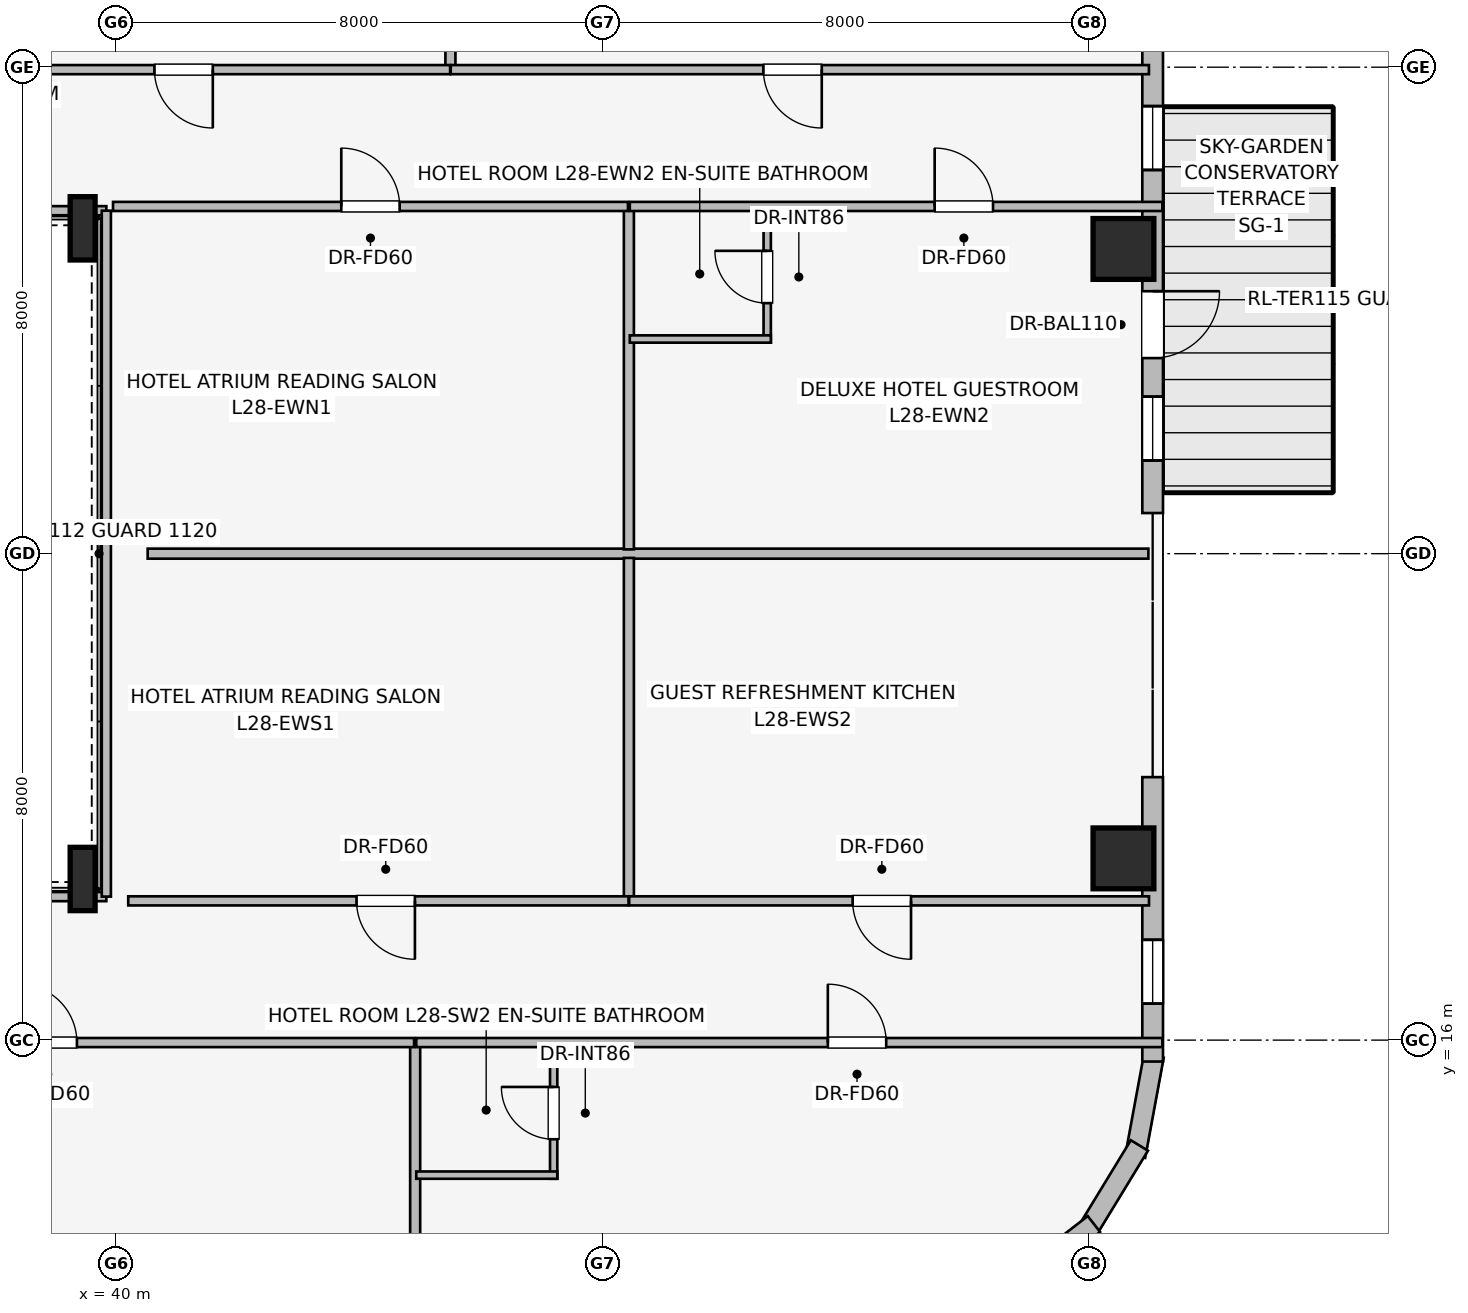
"""IFC4 building model, lengths in metres.
Left out: names, types, materials, properties, quantities, classifications, styles, units other than length and angle.
Written with IfcOpenShell. Run it as: python <this file> out.ifc"""

import sys

from ifc_helpers import new_model, si_unit, direction, frame, frame_2d, origin, origin_2d, place, context, subcontext, project, spatial, rectangle, i_section, extrude, element, fill, save


model = new_model("IFC4")
c1 = context("Model", 3, precision=1e-05, world=origin(), true_north=direction((0.0, 1.0)))
c2 = subcontext(c1, "Body", "Model", "MODEL_VIEW")
j1 = project(units=[si_unit("LENGTHUNIT", "METRE"), si_unit("PLANEANGLEUNIT", "RADIAN")], contexts=[c1])
p1 = place(None, origin())
s1 = spatial("IfcSite", under=j1, at=p1, CompositionType="ELEMENT")
p2 = place(p1, origin())
s2 = spatial("IfcBuilding", under=s1, at=p2, CompositionType="ELEMENT")
p3 = place(p2, frame((0.0, 0.0, 108.45)))
s3 = spatial("IfcBuildingStorey", under=s2, at=p3, CompositionType="ELEMENT", Elevation=108.45)
for number, where, z_axis, x_axis in (
    (1, (56.568, 18.989, 0.0), (0.0, 0.0, 1.0), (1.0, 0.0, 0.0)),
    (2, (56.568, 29.011, 0.0), (0.0, 0.0, 1.0), (1.0, 0.0, 0.0)),
):
    element("IfcColumn", number, at=place(p3, frame(where, z_axis=z_axis, x_axis=x_axis)), inside=s3, PredefinedType="COLUMN", context=c2, shape_type="SweptSolid", body=[
        extrude(rectangle(XDim=1.0, YDim=1.0, at=origin_2d()), origin(), (0.0, 0.0, 1.0), 3.45),
    ])
for number, where, z_axis, x_axis in (
    (3, (39.45, 18.65, 0.0), (0.0, 0.0, 1.0), (1.0, 0.0, 0.0)),
    (4, (39.45, 29.35, 0.0), (0.0, 0.0, 1.0), (1.0, 0.0, 0.0)),
):
    element("IfcColumn", number, at=place(p3, frame(where, z_axis=z_axis, x_axis=x_axis)), inside=s3, PredefinedType="COLUMN", context=c2, shape_type="SweptSolid", body=[
        extrude(i_section(OverallWidth=0.41, OverallDepth=1.041, WebThickness=0.031, FlangeThickness=0.056, at=origin_2d()), origin(), (0.0, 0.0, 1.0), 3.45),
    ])
for number, where, z_axis, x_axis in (
    (5, (56.763, 33.907, 0.0), (0.0, 0.0, 1.0), (0.182, -0.983, 0.0)),
    (6, (57.068, 15.742, 0.0), (0.0, 0.0, 1.0), (-0.182, -0.983, 0.0)),
):
    element("IfcWall", number, at=place(p3, frame(where, z_axis=z_axis, x_axis=x_axis)), inside=s3, PredefinedType="STANDARD", context=c2, shape_type="SweptSolid", body=[
        extrude(rectangle(XDim=1.677, YDim=0.33, at=frame_2d((0.838, 0.0))), origin(), (0.0, 0.0, 1.0), 3.16),
    ])
p4 = place(p3, frame((56.83, 14.268, 0.0), z_axis=(0.0, 0.0, 1.0), x_axis=(-0.520519429557, -0.853849824883, 0.0)))
e7 = element("IfcWall", 7, at=p4, inside=s3, PredefinedType="STANDARD", context=c2, shape_type="SweptSolid", body=[
    extrude(rectangle(XDim=1.677, YDim=0.33, at=frame_2d((0.839, 0.0))), origin(), (0.0, 0.0, 1.0), 3.16),
])
p5 = place(p3, frame((56.082, 12.976, 0.0), z_axis=(0.0, 0.0, 1.0), x_axis=(-0.790621329885, -0.612305408053, 0.0)))
e8 = element("IfcWall", 8, at=p5, inside=s3, PredefinedType="STANDARD", context=c2, shape_type="SweptSolid", body=[
    extrude(rectangle(XDim=1.676, YDim=0.33, at=frame_2d((0.838, 0.0))), origin(), (0.0, 0.0, 1.0), 3.16),
])
p6 = place(p3, frame((57.048, 32.352, 0.0), z_axis=(0.0, 0.0, 1.0), x_axis=(0.0, -1.0, 0.0)))
e9 = element("IfcWall", 9, at=p6, inside=s3, PredefinedType="STANDARD", context=c2, shape_type="SweptSolid", body=[
    extrude(rectangle(XDim=7.684, YDim=0.34, at=frame_2d((3.842, 0.0))), origin(), (0.0, 0.0, 1.0), 3.16),
])
p7 = place(p6, frame((4.036, 0.0, 0.0)))
e10 = element("IfcOpeningElement", 10, at=p7, cuts=e9, PredefinedType="OPENING", context=c2, shape_type="SweptSolid", body=[
    extrude(rectangle(XDim=1.1, YDim=2.04, at=frame_2d((0.55, 1.02))), frame((0.0, 0.18, 0.0), z_axis=(0.0, -1.0, 0.0), x_axis=(1.0, 0.0, 0.0)), (0.0, 0.0, 1.0), 0.36),
])
p8 = place(p6, frame((0.992, 0.0, 0.75)))
e11 = element("IfcOpeningElement", 11, at=p8, cuts=e9, PredefinedType="OPENING", context=c2, shape_type="SweptSolid", body=[
    extrude(rectangle(XDim=1.05, YDim=1.4, at=frame_2d((0.525, 0.7))), frame((0.0, 0.18, 0.0), z_axis=(0.0, -1.0, 0.0), x_axis=(1.0, 0.0, 0.0)), (0.0, 0.0, 1.0), 0.36),
])
p9 = place(p6, frame((5.77, 0.0, 0.75)))
e12 = element("IfcOpeningElement", 12, at=p9, cuts=e9, PredefinedType="OPENING", context=c2, shape_type="SweptSolid", body=[
    extrude(rectangle(XDim=1.05, YDim=1.4, at=frame_2d((0.525, 0.7))), frame((0.0, 0.18, 0.0), z_axis=(0.0, -1.0, 0.0), x_axis=(1.0, 0.0, 0.0)), (0.0, 0.0, 1.0), 0.36),
])
p10 = place(p3, frame((57.048, 20.325, 0.0), z_axis=(0.0, 0.0, 1.0), x_axis=(0.0, -1.0, 0.0)))
e13 = element("IfcWall", 13, at=p10, inside=s3, PredefinedType="STANDARD", context=c2, shape_type="SweptSolid", body=[
    extrude(rectangle(XDim=4.677, YDim=0.34, at=frame_2d((2.338, 0.0))), origin(), (0.0, 0.0, 1.0), 3.16),
])
p11 = place(p10, frame((2.675, 0.0, 0.75)))
e14 = element("IfcOpeningElement", 14, at=p11, cuts=e13, PredefinedType="OPENING", context=c2, shape_type="SweptSolid", body=[
    extrude(rectangle(XDim=1.05, YDim=1.4, at=frame_2d((0.525, 0.7))), frame((0.0, 0.18, 0.0), z_axis=(0.0, -1.0, 0.0), x_axis=(1.0, 0.0, 0.0)), (0.0, 0.0, 1.0), 0.36),
])
p12 = place(p3, frame((27.675, 18.36, 0.0), z_axis=(0.0, 0.0, 1.0), x_axis=(1.0, 0.0, 0.0)))
e15 = element("IfcWall", 15, at=p12, inside=s3, PredefinedType="PARTITIONING", context=c2, shape_type="SweptSolid", body=[
    extrude(rectangle(XDim=12.165, YDim=0.15, at=frame_2d((6.083, 0.0))), origin(), (0.0, 0.0, 1.0), 2.301),
])
p13 = place(p3, frame((39.84, 29.64, 0.0), z_axis=(0.0, 0.0, 1.0), x_axis=(-1.0, 0.0, 0.0)))
e16 = element("IfcWall", 16, at=p13, inside=s3, PredefinedType="PARTITIONING", context=c2, shape_type="SweptSolid", body=[
    extrude(rectangle(XDim=12.2, YDim=0.15, at=frame_2d((6.1, 0.0))), origin(), (0.0, 0.0, 1.0), 2.301),
])
p14 = place(p3, frame((39.84, 18.36, 0.0), z_axis=(0.0, 0.0, 1.0), x_axis=(0.0, 1.0, 0.0)))
e17 = element("IfcWall", 17, at=p14, inside=s3, PredefinedType="PARTITIONING", context=c2, shape_type="SweptSolid", body=[
    extrude(rectangle(XDim=11.28, YDim=0.15, at=frame_2d((5.64, 0.0))), origin(), (0.0, 0.0, 1.0), 3.16),
])
p15 = place(p3, frame((45.499, 31.97, 0.0), z_axis=(0.0, 0.0, 1.0), x_axis=(0.0, 1.0, 0.0)))
e18 = element("IfcWall", 18, at=p15, inside=s3, PredefinedType="PARTITIONING", context=c2, shape_type="SweptSolid", body=[
    extrude(rectangle(XDim=8.702, YDim=0.165, at=frame_2d((4.351, 0.0))), origin(), (0.0, 0.0, 1.0), 3.16),
])
p16 = place(p3, frame((45.494, 31.96, 0.0), z_axis=(0.0, 0.0, 1.0), x_axis=(-1.0, 0.0, 0.0)))
e19 = element("IfcWall", 19, at=p16, inside=s3, PredefinedType="PARTITIONING", context=c2, shape_type="SweptSolid", body=[
    extrude(rectangle(XDim=11.204, YDim=0.15, at=frame_2d((5.602, 0.0))), origin(), (0.0, 0.0, 1.0), 3.16),
])
p17 = place(p16, frame((3.903, 0.0, 0.0)))
e20 = element("IfcOpeningElement", 20, at=p17, cuts=e19, PredefinedType="OPENING", context=c2, shape_type="SweptSolid", body=[
    extrude(rectangle(XDim=0.96, YDim=2.0, at=frame_2d((0.48, 1.0))), frame((0.0, 0.085, 0.0), z_axis=(0.0, -1.0, 0.0), x_axis=(1.0, 0.0, 0.0)), (0.0, 0.0, 1.0), 0.17),
])
p18 = place(p3, frame((56.987, 31.96, 0.0), z_axis=(0.0, 0.0, 1.0), x_axis=(-1.0, 0.0, 0.0)))
e21 = element("IfcWall", 21, at=p18, inside=s3, PredefinedType="PARTITIONING", context=c2, shape_type="SweptSolid", body=[
    extrude(rectangle(XDim=11.483, YDim=0.15, at=frame_2d((5.742, 0.0))), origin(), (0.0, 0.0, 1.0), 3.16),
])
p19 = place(p18, frame((5.381, 0.0, 0.0)))
e22 = element("IfcOpeningElement", 22, at=p19, cuts=e21, PredefinedType="OPENING", context=c2, shape_type="SweptSolid", body=[
    extrude(rectangle(XDim=0.96, YDim=2.0, at=frame_2d((0.48, 1.0))), frame((0.0, 0.085, 0.0), z_axis=(0.0, -1.0, 0.0), x_axis=(1.0, 0.0, 0.0)), (0.0, 0.0, 1.0), 0.17),
])
p20 = place(p3, frame((40.52, 24.0, 0.0), z_axis=(0.0, 0.0, 1.0), x_axis=(1.0, 0.0, 0.0)))
e23 = element("IfcWall", 23, at=p20, inside=s3, PredefinedType="PARTITIONING", context=c2, shape_type="SweptSolid", body=[
    extrude(rectangle(XDim=16.458, YDim=0.165, at=frame_2d((8.229, 0.0))), origin(), (0.0, 0.0, 1.0), 3.16),
])
p21 = place(p3, frame((48.434, 24.07, 0.0), z_axis=(0.0, 0.0, 1.0), x_axis=(0.0, 1.0, 0.0)))
e24 = element("IfcWall", 24, at=p21, inside=s3, PredefinedType="PARTITIONING", context=c2, shape_type="SweptSolid", body=[
    extrude(rectangle(XDim=5.64, YDim=0.165, at=frame_2d((2.82, 0.0))), origin(), (0.0, 0.0, 1.0), 3.16),
])
p22 = place(p3, frame((39.95, 29.71, 0.0), z_axis=(0.0, 0.0, 1.0), x_axis=(1.0, 0.0, 0.0)))
e25 = element("IfcWall", 25, at=p22, inside=s3, PredefinedType="PARTITIONING", context=c2, shape_type="SweptSolid", body=[
    extrude(rectangle(XDim=8.469, YDim=0.15, at=frame_2d((4.234, 0.0))), origin(), (0.0, 0.0, 1.0), 3.16),
])
p23 = place(p22, frame((3.754, 0.0, 0.0)))
e26 = element("IfcOpeningElement", 26, at=p23, cuts=e25, PredefinedType="OPENING", context=c2, shape_type="SweptSolid", body=[
    extrude(rectangle(XDim=0.96, YDim=2.0, at=frame_2d((0.48, 1.0))), frame((0.0, 0.085, 0.0), z_axis=(0.0, -1.0, 0.0), x_axis=(1.0, 0.0, 0.0)), (0.0, 0.0, 1.0), 0.17),
])
p24 = place(p3, frame((50.709, 27.47, 0.0), z_axis=(0.0, 0.0, 1.0), x_axis=(0.0, 1.0, 0.0)))
e27 = element("IfcWall", 27, at=p24, inside=s3, PredefinedType="PARTITIONING", context=c2, shape_type="SweptSolid", body=[
    extrude(rectangle(XDim=2.24, YDim=0.12, at=frame_2d((1.12, 0.0))), origin(), (0.0, 0.0, 1.0), 3.16),
])
p25 = place(p24, frame((0.65, 0.0, 0.0)))
e28 = element("IfcOpeningElement", 28, at=p25, cuts=e27, PredefinedType="OPENING", context=c2, shape_type="SweptSolid", body=[
    extrude(rectangle(XDim=0.86, YDim=2.0, at=frame_2d((0.43, 1.0))), frame((0.0, 0.07, 0.0), z_axis=(0.0, -1.0, 0.0), x_axis=(1.0, 0.0, 0.0)), (0.0, 0.0, 1.0), 0.14),
])
p26 = place(p3, frame((48.449, 27.53, 0.0), z_axis=(0.0, 0.0, 1.0), x_axis=(1.0, 0.0, 0.0)))
e29 = element("IfcWall", 29, at=p26, inside=s3, PredefinedType="PARTITIONING", context=c2, shape_type="SweptSolid", body=[
    extrude(rectangle(XDim=2.32, YDim=0.12, at=frame_2d((1.16, 0.0))), origin(), (0.0, 0.0, 1.0), 3.16),
])
p27 = place(p3, frame((48.449, 29.71, 0.0), z_axis=(0.0, 0.0, 1.0), x_axis=(1.0, 0.0, 0.0)))
e30 = element("IfcWall", 30, at=p27, inside=s3, PredefinedType="PARTITIONING", context=c2, shape_type="SweptSolid", body=[
    extrude(rectangle(XDim=8.759, YDim=0.15, at=frame_2d((4.379, 0.0))), origin(), (0.0, 0.0, 1.0), 3.16),
])
p28 = place(p27, frame((5.014, 0.0, 0.0)))
e31 = element("IfcOpeningElement", 31, at=p28, cuts=e30, PredefinedType="OPENING", context=c2, shape_type="SweptSolid", body=[
    extrude(rectangle(XDim=0.96, YDim=2.0, at=frame_2d((0.48, 1.0))), frame((0.0, 0.085, 0.0), z_axis=(0.0, -1.0, 0.0), x_axis=(1.0, 0.0, 0.0)), (0.0, 0.0, 1.0), 0.17),
])
p29 = place(p3, frame((48.434, 18.29, 0.0), z_axis=(0.0, 0.0, 1.0), x_axis=(0.0, 1.0, 0.0)))
e32 = element("IfcWall", 32, at=p29, inside=s3, PredefinedType="PARTITIONING", context=c2, shape_type="SweptSolid", body=[
    extrude(rectangle(XDim=5.64, YDim=0.165, at=frame_2d((2.82, 0.0))), origin(), (0.0, 0.0, 1.0), 3.16),
])
p30 = place(p3, frame((48.429, 18.29, 0.0), z_axis=(0.0, 0.0, 1.0), x_axis=(-1.0, 0.0, 0.0)))
e33 = element("IfcWall", 33, at=p30, inside=s3, PredefinedType="PARTITIONING", context=c2, shape_type="SweptSolid", body=[
    extrude(rectangle(XDim=8.229, YDim=0.15, at=frame_2d((4.115, 0.0))), origin(), (0.0, 0.0, 1.0), 3.16),
])
p31 = place(p30, frame((3.514, 0.0, 0.0)))
e34 = element("IfcOpeningElement", 34, at=p31, cuts=e33, PredefinedType="OPENING", context=c2, shape_type="SweptSolid", body=[
    extrude(rectangle(XDim=0.96, YDim=2.0, at=frame_2d((0.48, 1.0))), frame((0.0, 0.085, 0.0), z_axis=(0.0, -1.0, 0.0), x_axis=(1.0, 0.0, 0.0)), (0.0, 0.0, 1.0), 0.17),
])
p32 = place(p3, frame((56.988, 18.29, 0.0), z_axis=(0.0, 0.0, 1.0), x_axis=(-1.0, 0.0, 0.0)))
e35 = element("IfcWall", 35, at=p32, inside=s3, PredefinedType="PARTITIONING", context=c2, shape_type="SweptSolid", body=[
    extrude(rectangle(XDim=8.549, YDim=0.15, at=frame_2d((4.274, 0.0))), origin(), (0.0, 0.0, 1.0), 3.16),
])
p33 = place(p32, frame((3.914, 0.0, 0.0)))
e36 = element("IfcOpeningElement", 36, at=p33, cuts=e35, PredefinedType="OPENING", context=c2, shape_type="SweptSolid", body=[
    extrude(rectangle(XDim=0.96, YDim=2.0, at=frame_2d((0.48, 1.0))), frame((0.0, 0.085, 0.0), z_axis=(0.0, -1.0, 0.0), x_axis=(1.0, 0.0, 0.0)), (0.0, 0.0, 1.0), 0.17),
])
p34 = place(p3, frame((44.919, 7.029, 0.0), z_axis=(0.0, 0.0, 1.0), x_axis=(0.0, 1.0, 0.0)))
e37 = element("IfcWall", 37, at=p34, inside=s3, PredefinedType="PARTITIONING", context=c2, shape_type="SweptSolid", body=[
    extrude(rectangle(XDim=8.901, YDim=0.165, at=frame_2d((4.45, 0.0))), origin(), (0.0, 0.0, 1.0), 3.16),
])
p35 = place(p3, frame((32.85, 15.96, 0.0), z_axis=(0.0, 0.0, 1.0), x_axis=(1.0, 0.0, 0.0)))
e38 = element("IfcWall", 38, at=p35, inside=s3, PredefinedType="PARTITIONING", context=c2, shape_type="SweptSolid", body=[
    extrude(rectangle(XDim=12.051, YDim=0.15, at=frame_2d((6.025, 0.0))), origin(), (0.0, 0.0, 1.0), 3.16),
])
p36 = place(p35, frame((5.546, 0.0, 0.0)))
e39 = element("IfcOpeningElement", 39, at=p36, cuts=e38, PredefinedType="OPENING", context=c2, shape_type="SweptSolid", body=[
    extrude(rectangle(XDim=0.96, YDim=2.0, at=frame_2d((0.48, 1.0))), frame((0.0, 0.085, 0.0), z_axis=(0.0, -1.0, 0.0), x_axis=(1.0, 0.0, 0.0)), (0.0, 0.0, 1.0), 0.17),
])
p37 = place(p3, frame((47.197, 13.72, 0.0), z_axis=(0.0, 0.0, 1.0), x_axis=(0.0, 1.0, 0.0)))
e40 = element("IfcWall", 40, at=p37, inside=s3, PredefinedType="PARTITIONING", context=c2, shape_type="SweptSolid", body=[
    extrude(rectangle(XDim=2.24, YDim=0.12, at=frame_2d((1.12, 0.0))), origin(), (0.0, 0.0, 1.0), 3.16),
])
p38 = place(p37, frame((0.65, 0.0, 0.0)))
e41 = element("IfcOpeningElement", 41, at=p38, cuts=e40, PredefinedType="OPENING", context=c2, shape_type="SweptSolid", body=[
    extrude(rectangle(XDim=0.86, YDim=2.0, at=frame_2d((0.43, 1.0))), frame((0.0, 0.07, 0.0), z_axis=(0.0, -1.0, 0.0), x_axis=(1.0, 0.0, 0.0)), (0.0, 0.0, 1.0), 0.14),
])
p39 = place(p3, frame((44.937, 13.78, 0.0), z_axis=(0.0, 0.0, 1.0), x_axis=(1.0, 0.0, 0.0)))
e42 = element("IfcWall", 42, at=p39, inside=s3, PredefinedType="PARTITIONING", context=c2, shape_type="SweptSolid", body=[
    extrude(rectangle(XDim=2.32, YDim=0.12, at=frame_2d((1.16, 0.0))), origin(), (0.0, 0.0, 1.0), 3.16),
])
p40 = place(p3, frame((44.937, 15.96, 0.0), z_axis=(0.0, 0.0, 1.0), x_axis=(1.0, 0.0, 0.0)))
e43 = element("IfcWall", 43, at=p40, inside=s3, PredefinedType="PARTITIONING", context=c2, shape_type="SweptSolid", body=[
    extrude(rectangle(XDim=12.271, YDim=0.15, at=frame_2d((6.135, 0.0))), origin(), (0.0, 0.0, 1.0), 3.16),
])
p41 = place(p40, frame((6.769, 0.0, 0.0)))
e44 = element("IfcOpeningElement", 44, at=p41, cuts=e43, PredefinedType="OPENING", context=c2, shape_type="SweptSolid", body=[
    extrude(rectangle(XDim=0.96, YDim=2.0, at=frame_2d((0.48, 1.0))), frame((0.0, 0.085, 0.0), z_axis=(0.0, -1.0, 0.0), x_axis=(1.0, 0.0, 0.0)), (0.0, 0.0, 1.0), 0.17),
])
p42 = place(p7, origin())
e45 = element("IfcDoor", 45, at=p42, inside=s3, OperationType="SINGLE_SWING_LEFT", PredefinedType="DOOR", context=c2, shape_type="SweptSolid", body=[
    extrude(rectangle(XDim=1.1, YDim=2.04, at=frame_2d((0.55, 1.02))), frame((0.0, 0.025, 0.0), z_axis=(0.0, -1.0, 0.0), x_axis=(1.0, 0.0, 0.0)), (0.0, 0.0, 1.0), 0.05),
])
fill(e10, e45)
p43 = place(p8, origin())
e46 = element("IfcWindow", 46, at=p43, inside=s3, PartitioningType="SINGLE_PANEL", PredefinedType="WINDOW", context=c2, shape_type="SweptSolid", body=[
    extrude(rectangle(XDim=1.05, YDim=1.4, at=frame_2d((0.525, 0.7))), frame((0.0, 0.03, 0.0), z_axis=(0.0, -1.0, 0.0), x_axis=(1.0, 0.0, 0.0)), (0.0, 0.0, 1.0), 0.06),
])
fill(e11, e46)
p44 = place(p9, origin())
e47 = element("IfcWindow", 47, at=p44, inside=s3, PartitioningType="SINGLE_PANEL", PredefinedType="WINDOW", context=c2, shape_type="SweptSolid", body=[
    extrude(rectangle(XDim=1.05, YDim=1.4, at=frame_2d((0.525, 0.7))), frame((0.0, 0.03, 0.0), z_axis=(0.0, -1.0, 0.0), x_axis=(1.0, 0.0, 0.0)), (0.0, 0.0, 1.0), 0.06),
])
fill(e12, e47)
p45 = place(p11, origin())
e48 = element("IfcWindow", 48, at=p45, inside=s3, PartitioningType="SINGLE_PANEL", PredefinedType="WINDOW", context=c2, shape_type="SweptSolid", body=[
    extrude(rectangle(XDim=1.05, YDim=1.4, at=frame_2d((0.525, 0.7))), frame((0.0, 0.03, 0.0), z_axis=(0.0, -1.0, 0.0), x_axis=(1.0, 0.0, 0.0)), (0.0, 0.0, 1.0), 0.06),
])
fill(e14, e48)
p46 = place(p17, origin())
e49 = element("IfcDoor", 49, at=p46, inside=s3, OperationType="SINGLE_SWING_LEFT", PredefinedType="DOOR", context=c2, shape_type="SweptSolid", body=[
    extrude(rectangle(XDim=0.96, YDim=2.0, at=frame_2d((0.48, 1.0))), frame((0.0, 0.025, 0.0), z_axis=(0.0, -1.0, 0.0), x_axis=(1.0, 0.0, 0.0)), (0.0, 0.0, 1.0), 0.05),
])
fill(e20, e49)
p47 = place(p19, origin())
e50 = element("IfcDoor", 50, at=p47, inside=s3, OperationType="SINGLE_SWING_LEFT", PredefinedType="DOOR", context=c2, shape_type="SweptSolid", body=[
    extrude(rectangle(XDim=0.96, YDim=2.0, at=frame_2d((0.48, 1.0))), frame((0.0, 0.025, 0.0), z_axis=(0.0, -1.0, 0.0), x_axis=(1.0, 0.0, 0.0)), (0.0, 0.0, 1.0), 0.05),
])
fill(e22, e50)
p48 = place(p23, origin())
e51 = element("IfcDoor", 51, at=p48, inside=s3, OperationType="SINGLE_SWING_LEFT", PredefinedType="DOOR", context=c2, shape_type="SweptSolid", body=[
    extrude(rectangle(XDim=0.96, YDim=2.0, at=frame_2d((0.48, 1.0))), frame((0.0, 0.025, 0.0), z_axis=(0.0, -1.0, 0.0), x_axis=(1.0, 0.0, 0.0)), (0.0, 0.0, 1.0), 0.05),
])
fill(e26, e51)
p49 = place(p25, origin())
e52 = element("IfcDoor", 52, at=p49, inside=s3, OperationType="SINGLE_SWING_RIGHT", PredefinedType="DOOR", context=c2, shape_type="SweptSolid", body=[
    extrude(rectangle(XDim=0.86, YDim=2.0, at=frame_2d((0.43, 1.0))), frame((0.0, 0.025, 0.0), z_axis=(0.0, -1.0, 0.0), x_axis=(1.0, 0.0, 0.0)), (0.0, 0.0, 1.0), 0.05),
])
fill(e28, e52)
p50 = place(p28, origin())
e53 = element("IfcDoor", 53, at=p50, inside=s3, OperationType="SINGLE_SWING_LEFT", PredefinedType="DOOR", context=c2, shape_type="SweptSolid", body=[
    extrude(rectangle(XDim=0.96, YDim=2.0, at=frame_2d((0.48, 1.0))), frame((0.0, 0.025, 0.0), z_axis=(0.0, -1.0, 0.0), x_axis=(1.0, 0.0, 0.0)), (0.0, 0.0, 1.0), 0.05),
])
fill(e31, e53)
p51 = place(p31, origin())
e54 = element("IfcDoor", 54, at=p51, inside=s3, OperationType="SINGLE_SWING_LEFT", PredefinedType="DOOR", context=c2, shape_type="SweptSolid", body=[
    extrude(rectangle(XDim=0.96, YDim=2.0, at=frame_2d((0.48, 1.0))), frame((0.0, 0.025, 0.0), z_axis=(0.0, -1.0, 0.0), x_axis=(1.0, 0.0, 0.0)), (0.0, 0.0, 1.0), 0.05),
])
fill(e34, e54)
p52 = place(p33, origin())
e55 = element("IfcDoor", 55, at=p52, inside=s3, OperationType="SINGLE_SWING_LEFT", PredefinedType="DOOR", context=c2, shape_type="SweptSolid", body=[
    extrude(rectangle(XDim=0.96, YDim=2.0, at=frame_2d((0.48, 1.0))), frame((0.0, 0.025, 0.0), z_axis=(0.0, -1.0, 0.0), x_axis=(1.0, 0.0, 0.0)), (0.0, 0.0, 1.0), 0.05),
])
fill(e36, e55)
p53 = place(p36, origin())
e56 = element("IfcDoor", 56, at=p53, inside=s3, OperationType="SINGLE_SWING_LEFT", PredefinedType="DOOR", context=c2, shape_type="SweptSolid", body=[
    extrude(rectangle(XDim=0.96, YDim=2.0, at=frame_2d((0.48, 1.0))), frame((0.0, 0.025, 0.0), z_axis=(0.0, -1.0, 0.0), x_axis=(1.0, 0.0, 0.0)), (0.0, 0.0, 1.0), 0.05),
])
fill(e39, e56)
p54 = place(p38, origin())
e57 = element("IfcDoor", 57, at=p54, inside=s3, OperationType="SINGLE_SWING_RIGHT", PredefinedType="DOOR", context=c2, shape_type="SweptSolid", body=[
    extrude(rectangle(XDim=0.86, YDim=2.0, at=frame_2d((0.43, 1.0))), frame((0.0, 0.025, 0.0), z_axis=(0.0, -1.0, 0.0), x_axis=(1.0, 0.0, 0.0)), (0.0, 0.0, 1.0), 0.05),
])
fill(e41, e57)
p55 = place(p41, origin())
e58 = element("IfcDoor", 58, at=p55, inside=s3, OperationType="SINGLE_SWING_LEFT", PredefinedType="DOOR", context=c2, shape_type="SweptSolid", body=[
    extrude(rectangle(XDim=0.96, YDim=2.0, at=frame_2d((0.48, 1.0))), frame((0.0, 0.025, 0.0), z_axis=(0.0, -1.0, 0.0), x_axis=(1.0, 0.0, 0.0)), (0.0, 0.0, 1.0), 0.05),
])
fill(e44, e58)
save(model, sys.argv[1])
